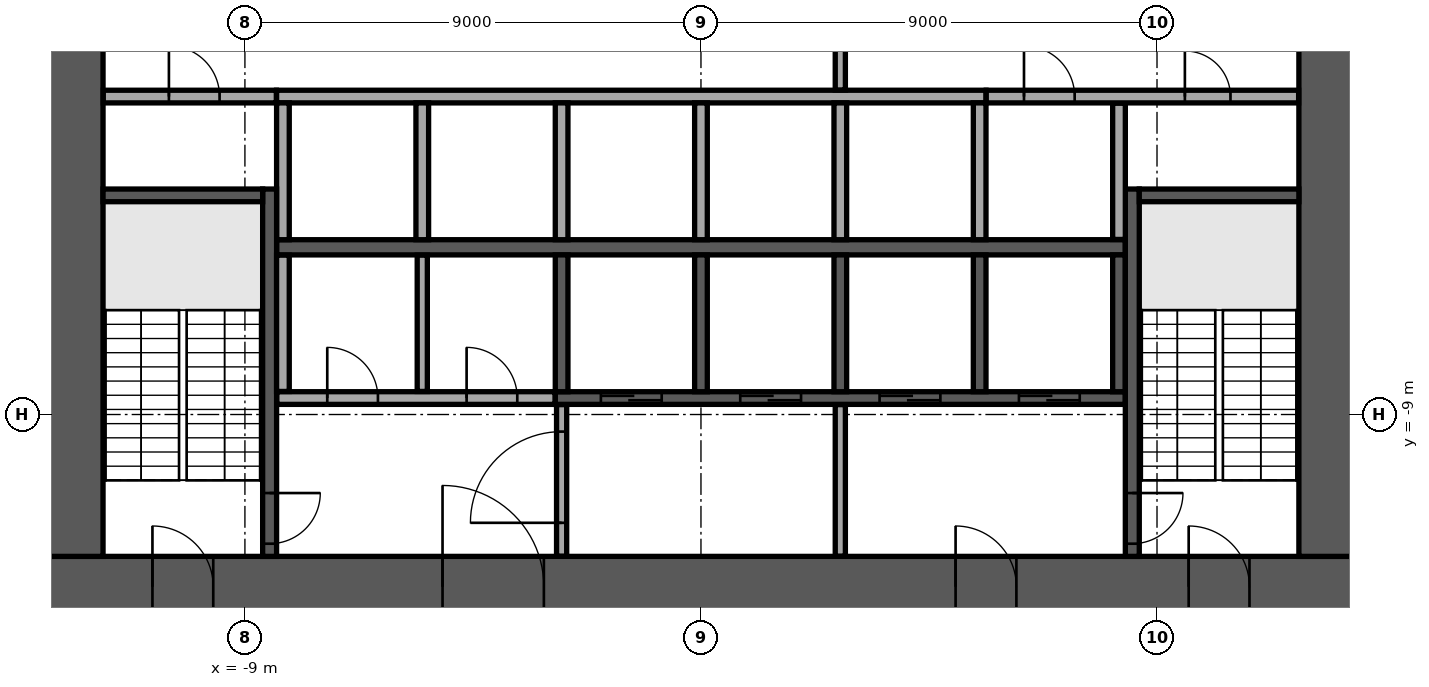
"""IFC4 building model, lengths in metres.
Left out: names, types, materials, properties, quantities, classifications, styles, units other than length and angle.
Written with IfcOpenShell. Run it as: python <this file> out.ifc"""

import sys

from ifc_helpers import new_model, si_unit, direction, frame, frame_2d, origin, place, context, subcontext, project, spatial, rectangle, extrude, element, fill, save


model = new_model("IFC4")
c1 = context("Model", 3, precision=1e-05, world=origin(), true_north=direction((0.0, 1.0)))
c2 = subcontext(c1, "Body", "Model", "MODEL_VIEW")
j1 = project(units=[si_unit("LENGTHUNIT", "METRE"), si_unit("PLANEANGLEUNIT", "RADIAN")], contexts=[c1])
p1 = place(None, origin())
s1 = spatial("IfcSite", under=j1, at=p1, CompositionType="ELEMENT")
p2 = place(p1, origin())
s2 = spatial("IfcBuilding", under=s1, at=p2, CompositionType="ELEMENT")
p3 = place(p2, frame((0.0, 0.0, 27.3)))
s3 = spatial("IfcBuildingStorey", under=s2, at=p3, CompositionType="ELEMENT", Elevation=27.3)
p4 = place(p3, frame((-13.0, -12.4, 0.0), z_axis=(0.0, 0.0, 1.0), x_axis=(1.0, 0.0, 0.0)))
e1 = element("IfcWall", 1, at=p4, inside=s3, PredefinedType="SHEAR", context=c2, shape_type="SweptSolid", body=[
    extrude(rectangle(XDim=26.0, YDim=1.2, at=frame_2d((13.0, 0.0))), origin(), (0.0, 0.0, 1.0), 4.35),
])
p5 = place(p4, frame((7.9, 0.0, 0.0)))
e2 = element("IfcOpeningElement", 2, at=p5, cuts=e1, PredefinedType="OPENING", context=c2, shape_type="SweptSolid", body=[
    extrude(rectangle(XDim=2.0, YDim=2.1, at=frame_2d((1.0, 1.05))), frame((0.0, 0.61, 0.0), z_axis=(0.0, -1.0, 0.0), x_axis=(1.0, 0.0, 0.0)), (0.0, 0.0, 1.0), 1.22),
])
p6 = place(p4, frame((18.025, 0.0, 0.0)))
e3 = element("IfcOpeningElement", 3, at=p6, cuts=e1, PredefinedType="OPENING", context=c2, shape_type="SweptSolid", body=[
    extrude(rectangle(XDim=1.2, YDim=2.1, at=frame_2d((0.6, 1.05))), frame((0.0, 0.61, 0.0), z_axis=(0.0, -1.0, 0.0), x_axis=(1.0, 0.0, 0.0)), (0.0, 0.0, 1.0), 1.22),
])
p7 = place(p4, frame((2.175, 0.0, 0.0)))
e4 = element("IfcOpeningElement", 4, at=p7, cuts=e1, PredefinedType="OPENING", context=c2, shape_type="SweptSolid", body=[
    extrude(rectangle(XDim=1.2, YDim=2.1, at=frame_2d((0.6, 1.05))), frame((0.0, 0.61, 0.0), z_axis=(0.0, -1.0, 0.0), x_axis=(1.0, 0.0, 0.0)), (0.0, 0.0, 1.0), 1.22),
])
p8 = place(p4, frame((22.625, 0.0, 0.0)))
e5 = element("IfcOpeningElement", 5, at=p8, cuts=e1, PredefinedType="OPENING", context=c2, shape_type="SweptSolid", body=[
    extrude(rectangle(XDim=1.2, YDim=2.1, at=frame_2d((0.6, 1.05))), frame((0.0, 0.61, 0.0), z_axis=(0.0, -1.0, 0.0), x_axis=(1.0, 0.0, 0.0)), (0.0, 0.0, 1.0), 1.22),
])
p9 = place(p3, frame((12.4, -11.8, 0.0), z_axis=(0.0, 0.0, 1.0), x_axis=(0.0, 1.0, 0.0)))
e6 = element("IfcWall", 6, at=p9, inside=s3, PredefinedType="SHEAR", context=c2, shape_type="SweptSolid", body=[
    extrude(rectangle(XDim=23.6, YDim=1.2, at=frame_2d((11.8, 0.0))), origin(), (0.0, 0.0, 1.0), 4.35),
])
p10 = place(p9, frame((10.6, 0.0, 0.0)))
e7 = element("IfcOpeningElement", 7, at=p10, cuts=e6, PredefinedType="OPENING", context=c2, shape_type="SweptSolid", body=[
    extrude(rectangle(XDim=2.4, YDim=2.4, at=frame_2d((1.2, 1.2))), frame((0.0, 0.61, 0.0), z_axis=(0.0, -1.0, 0.0), x_axis=(1.0, 0.0, 0.0)), (0.0, 0.0, 1.0), 1.22),
])
p11 = place(p3, frame((-12.4, -11.8, 0.0), z_axis=(0.0, 0.0, 1.0), x_axis=(0.0, 1.0, 0.0)))
e8 = element("IfcWall", 8, at=p11, inside=s3, PredefinedType="SHEAR", context=c2, shape_type="SweptSolid", body=[
    extrude(rectangle(XDim=23.6, YDim=1.2, at=frame_2d((11.8, 0.0))), origin(), (0.0, 0.0, 1.0), 4.35),
])
p12 = place(p11, frame((10.6, 0.0, 0.0)))
e9 = element("IfcOpeningElement", 9, at=p12, cuts=e8, PredefinedType="OPENING", context=c2, shape_type="SweptSolid", body=[
    extrude(rectangle(XDim=2.4, YDim=2.4, at=frame_2d((1.2, 1.2))), frame((0.0, 0.61, 0.0), z_axis=(0.0, -1.0, 0.0), x_axis=(1.0, 0.0, 0.0)), (0.0, 0.0, 1.0), 1.22),
])
p13 = place(p3, frame((-8.375, -5.7, 0.0), z_axis=(0.0, 0.0, 1.0), x_axis=(1.0, 0.0, 0.0)))
e10 = element("IfcWall", 10, at=p13, inside=s3, PredefinedType="SOLIDWALL", context=c2, shape_type="SweptSolid", body=[
    extrude(rectangle(XDim=16.75, YDim=0.3, at=frame_2d((8.375, 0.0))), origin(), (0.0, 0.0, 1.0), 4.35),
])
p14 = place(p3, frame((-8.375, -2.725, 0.0), z_axis=(0.0, 0.0, 1.0), x_axis=(1.0, 0.0, 0.0)))
e11 = element("IfcWall", 11, at=p14, inside=s3, PredefinedType="SOLIDWALL", context=c2, shape_type="SweptSolid", body=[
    extrude(rectangle(XDim=14.0, YDim=0.25, at=frame_2d((7.0, 0.0))), origin(), (0.0, 0.0, 1.0), 4.35),
])
for number, where, z_axis, x_axis in (
    (12, (-8.25, -5.55, 0.0), (0.0, 0.0, 1.0), (0.0, 1.0, 0.0)),
    (13, (-5.5, -5.55, 0.0), (0.0, 0.0, 1.0), (0.0, 1.0, 0.0)),
    (14, (-2.75, -5.55, 0.0), (0.0, 0.0, 1.0), (0.0, 1.0, 0.0)),
    (15, (0.0, -5.55, 0.0), (0.0, 0.0, 1.0), (0.0, 1.0, 0.0)),
    (16, (2.75, -5.55, 0.0), (0.0, 0.0, 1.0), (0.0, 1.0, 0.0)),
    (17, (5.5, -5.55, 0.0), (0.0, 0.0, 1.0), (0.0, 1.0, 0.0)),
):
    element("IfcWall", number, at=place(p3, frame(where, z_axis=z_axis, x_axis=x_axis)), inside=s3, PredefinedType="SOLIDWALL", context=c2, shape_type="SweptSolid", body=[
        extrude(rectangle(XDim=2.7, YDim=0.25, at=frame_2d((1.35, 0.0))), origin(), (0.0, 0.0, 1.0), 4.35),
    ])
p15 = place(p3, frame((-2.875, -8.675, 0.0), z_axis=(0.0, 0.0, 1.0), x_axis=(1.0, 0.0, 0.0)))
e18 = element("IfcWall", 18, at=p15, inside=s3, PredefinedType="SOLIDWALL", context=c2, shape_type="SweptSolid", body=[
    extrude(rectangle(XDim=11.25, YDim=0.25, at=frame_2d((5.625, 0.0))), origin(), (0.0, 0.0, 1.0), 4.35),
])
p16 = place(p15, frame((0.9, 0.0, 0.0)))
e19 = element("IfcOpeningElement", 19, at=p16, cuts=e18, PredefinedType="OPENING", context=c2, shape_type="SweptSolid", body=[
    extrude(rectangle(XDim=1.2, YDim=2.1, at=frame_2d((0.6, 1.05))), frame((0.0, 0.135, 0.0), z_axis=(0.0, -1.0, 0.0), x_axis=(1.0, 0.0, 0.0)), (0.0, 0.0, 1.0), 0.27),
])
p17 = place(p15, frame((3.65, 0.0, 0.0)))
e20 = element("IfcOpeningElement", 20, at=p17, cuts=e18, PredefinedType="OPENING", context=c2, shape_type="SweptSolid", body=[
    extrude(rectangle(XDim=1.2, YDim=2.1, at=frame_2d((0.6, 1.05))), frame((0.0, 0.135, 0.0), z_axis=(0.0, -1.0, 0.0), x_axis=(1.0, 0.0, 0.0)), (0.0, 0.0, 1.0), 0.27),
])
p18 = place(p15, frame((6.4, 0.0, 0.0)))
e21 = element("IfcOpeningElement", 21, at=p18, cuts=e18, PredefinedType="OPENING", context=c2, shape_type="SweptSolid", body=[
    extrude(rectangle(XDim=1.2, YDim=2.1, at=frame_2d((0.6, 1.05))), frame((0.0, 0.135, 0.0), z_axis=(0.0, -1.0, 0.0), x_axis=(1.0, 0.0, 0.0)), (0.0, 0.0, 1.0), 0.27),
])
p19 = place(p15, frame((9.15, 0.0, 0.0)))
e22 = element("IfcOpeningElement", 22, at=p19, cuts=e18, PredefinedType="OPENING", context=c2, shape_type="SweptSolid", body=[
    extrude(rectangle(XDim=1.2, YDim=2.1, at=frame_2d((0.6, 1.05))), frame((0.0, 0.135, 0.0), z_axis=(0.0, -1.0, 0.0), x_axis=(1.0, 0.0, 0.0)), (0.0, 0.0, 1.0), 0.27),
])
for number, where, z_axis, x_axis in (
    (23, (-2.75, -8.55, 0.0), (0.0, 0.0, 1.0), (0.0, 1.0, 0.0)),
    (24, (0.0, -8.55, 0.0), (0.0, 0.0, 1.0), (0.0, 1.0, 0.0)),
    (25, (2.75, -8.55, 0.0), (0.0, 0.0, 1.0), (0.0, 1.0, 0.0)),
    (26, (5.5, -8.55, 0.0), (0.0, 0.0, 1.0), (0.0, 1.0, 0.0)),
    (27, (8.25, -8.55, 0.0), (0.0, 0.0, 1.0), (0.0, 1.0, 0.0)),
):
    element("IfcWall", number, at=place(p3, frame(where, z_axis=z_axis, x_axis=x_axis)), inside=s3, PredefinedType="SOLIDWALL", context=c2, shape_type="SweptSolid", body=[
        extrude(rectangle(XDim=2.7, YDim=0.25, at=frame_2d((1.35, 0.0))), origin(), (0.0, 0.0, 1.0), 4.35),
    ])
p20 = place(p3, frame((-8.512, -4.55, 0.0), z_axis=(0.0, 0.0, 1.0), x_axis=(0.0, -1.0, 0.0)))
e28 = element("IfcWall", 28, at=p20, inside=s3, PredefinedType="SOLIDWALL", context=c2, shape_type="SweptSolid", body=[
    extrude(rectangle(XDim=7.25, YDim=0.275, at=frame_2d((3.625, 0.0))), origin(), (0.0, 0.0, 1.0), 4.35),
])
p21 = place(p20, frame((6.0, 0.0, 0.0)))
e29 = element("IfcOpeningElement", 29, at=p21, cuts=e28, PredefinedType="OPENING", context=c2, shape_type="SweptSolid", body=[
    extrude(rectangle(XDim=1.0, YDim=2.1, at=frame_2d((0.5, 1.05))), frame((0.0, 0.147, 0.0), z_axis=(0.0, -1.0, 0.0), x_axis=(1.0, 0.0, 0.0)), (0.0, 0.0, 1.0), 0.295),
])
p22 = place(p3, frame((-8.65, -4.675, 0.0), z_axis=(0.0, 0.0, 1.0), x_axis=(-1.0, 0.0, 0.0)))
e30 = element("IfcWall", 30, at=p22, inside=s3, PredefinedType="SOLIDWALL", context=c2, shape_type="SweptSolid", body=[
    extrude(rectangle(XDim=3.15, YDim=0.25, at=frame_2d((1.575, 0.0))), origin(), (0.0, 0.0, 1.0), 4.35),
])
p23 = place(p3, frame((8.512, -4.55, 0.0), z_axis=(0.0, 0.0, 1.0), x_axis=(0.0, -1.0, 0.0)))
e31 = element("IfcWall", 31, at=p23, inside=s3, PredefinedType="SOLIDWALL", context=c2, shape_type="SweptSolid", body=[
    extrude(rectangle(XDim=7.25, YDim=0.275, at=frame_2d((3.625, 0.0))), origin(), (0.0, 0.0, 1.0), 4.35),
])
p24 = place(p23, frame((6.0, 0.0, 0.0)))
e32 = element("IfcOpeningElement", 32, at=p24, cuts=e31, PredefinedType="OPENING", context=c2, shape_type="SweptSolid", body=[
    extrude(rectangle(XDim=1.0, YDim=2.1, at=frame_2d((0.5, 1.05))), frame((0.0, 0.147, 0.0), z_axis=(0.0, -1.0, 0.0), x_axis=(1.0, 0.0, 0.0)), (0.0, 0.0, 1.0), 0.295),
])
p25 = place(p3, frame((8.65, -4.675, 0.0), z_axis=(0.0, 0.0, 1.0), x_axis=(1.0, 0.0, 0.0)))
e33 = element("IfcWall", 33, at=p25, inside=s3, PredefinedType="SOLIDWALL", context=c2, shape_type="SweptSolid", body=[
    extrude(rectangle(XDim=3.15, YDim=0.25, at=frame_2d((1.575, 0.0))), origin(), (0.0, 0.0, 1.0), 4.35),
])
p26 = place(p3, frame((-2.75, -11.795, 0.0), z_axis=(0.0, 0.0, 1.0), x_axis=(0.0, 1.0, 0.0)))
e34 = element("IfcWall", 34, at=p26, inside=s3, PredefinedType="PARTITIONING", context=c2, shape_type="SweptSolid", body=[
    extrude(rectangle(XDim=2.99, YDim=0.2, at=frame_2d((1.495, 0.0))), origin(), (0.0, 0.0, 1.0), 4.35),
])
p27 = place(p26, frame((0.657, 0.0, 0.0)))
e35 = element("IfcOpeningElement", 35, at=p27, cuts=e34, PredefinedType="OPENING", context=c2, shape_type="SweptSolid", body=[
    extrude(rectangle(XDim=1.8, YDim=2.1, at=frame_2d((0.9, 1.05))), frame((0.0, 0.11, 0.0), z_axis=(0.0, -1.0, 0.0), x_axis=(1.0, 0.0, 0.0)), (0.0, 0.0, 1.0), 0.22),
])
p28 = place(p3, frame((2.75, -11.795, 0.0), z_axis=(0.0, 0.0, 1.0), x_axis=(0.0, 1.0, 0.0)))
e36 = element("IfcWall", 36, at=p28, inside=s3, PredefinedType="PARTITIONING", context=c2, shape_type="SweptSolid", body=[
    extrude(rectangle(XDim=2.99, YDim=0.2, at=frame_2d((1.495, 0.0))), origin(), (0.0, 0.0, 1.0), 4.35),
])
p29 = place(p3, frame((-8.37, -8.675, 0.0), z_axis=(0.0, 0.0, 1.0), x_axis=(1.0, 0.0, 0.0)))
e37 = element("IfcWall", 37, at=p29, inside=s3, PredefinedType="PARTITIONING", context=c2, shape_type="SweptSolid", body=[
    extrude(rectangle(XDim=5.49, YDim=0.25, at=frame_2d((2.745, 0.0))), origin(), (0.0, 0.0, 1.0), 4.35),
])
p30 = place(p29, frame((0.995, 0.0, 0.0)))
e38 = element("IfcOpeningElement", 38, at=p30, cuts=e37, PredefinedType="OPENING", context=c2, shape_type="SweptSolid", body=[
    extrude(rectangle(XDim=1.0, YDim=2.1, at=frame_2d((0.5, 1.05))), frame((0.0, 0.135, 0.0), z_axis=(0.0, -1.0, 0.0), x_axis=(1.0, 0.0, 0.0)), (0.0, 0.0, 1.0), 0.27),
])
p31 = place(p29, frame((3.745, 0.0, 0.0)))
e39 = element("IfcOpeningElement", 39, at=p31, cuts=e37, PredefinedType="OPENING", context=c2, shape_type="SweptSolid", body=[
    extrude(rectangle(XDim=1.0, YDim=2.1, at=frame_2d((0.5, 1.05))), frame((0.0, 0.135, 0.0), z_axis=(0.0, -1.0, 0.0), x_axis=(1.0, 0.0, 0.0)), (0.0, 0.0, 1.0), 0.27),
])
p32 = place(p3, frame((-8.25, -8.545, 0.0), z_axis=(0.0, 0.0, 1.0), x_axis=(0.0, 1.0, 0.0)))
e40 = element("IfcWall", 40, at=p32, inside=s3, PredefinedType="PARTITIONING", context=c2, shape_type="SweptSolid", body=[
    extrude(rectangle(XDim=2.69, YDim=0.25, at=frame_2d((1.345, 0.0))), origin(), (0.0, 0.0, 1.0), 4.35),
])
p33 = place(p3, frame((-5.5, -8.545, 0.0), z_axis=(0.0, 0.0, 1.0), x_axis=(0.0, 1.0, 0.0)))
e41 = element("IfcWall", 41, at=p33, inside=s3, PredefinedType="PARTITIONING", context=c2, shape_type="SweptSolid", body=[
    extrude(rectangle(XDim=2.69, YDim=0.2, at=frame_2d((1.345, 0.0))), origin(), (0.0, 0.0, 1.0), 4.35),
])
p34 = place(p3, frame((8.25, -5.545, 0.0), z_axis=(0.0, 0.0, 1.0), x_axis=(0.0, 1.0, 0.0)))
e42 = element("IfcWall", 42, at=p34, inside=s3, PredefinedType="PARTITIONING", context=c2, shape_type="SweptSolid", body=[
    extrude(rectangle(XDim=2.69, YDim=0.25, at=frame_2d((1.345, 0.0))), origin(), (0.0, 0.0, 1.0), 4.35),
])
p35 = place(p3, frame((-11.795, -2.725, 0.0), z_axis=(0.0, 0.0, 1.0), x_axis=(1.0, 0.0, 0.0)))
e43 = element("IfcWall", 43, at=p35, inside=s3, PredefinedType="PARTITIONING", context=c2, shape_type="SweptSolid", body=[
    extrude(rectangle(XDim=3.415, YDim=0.25, at=frame_2d((1.708, 0.0))), origin(), (0.0, 0.0, 1.0), 4.35),
])
p36 = place(p35, frame((1.295, 0.0, 0.0)))
e44 = element("IfcOpeningElement", 44, at=p36, cuts=e43, PredefinedType="OPENING", context=c2, shape_type="SweptSolid", body=[
    extrude(rectangle(XDim=1.0, YDim=2.1, at=frame_2d((0.5, 1.05))), frame((0.0, 0.135, 0.0), z_axis=(0.0, -1.0, 0.0), x_axis=(1.0, 0.0, 0.0)), (0.0, 0.0, 1.0), 0.27),
])
p37 = place(p3, frame((5.63, -2.725, 0.0), z_axis=(0.0, 0.0, 1.0), x_axis=(1.0, 0.0, 0.0)))
e45 = element("IfcWall", 45, at=p37, inside=s3, PredefinedType="PARTITIONING", context=c2, shape_type="SweptSolid", body=[
    extrude(rectangle(XDim=6.165, YDim=0.25, at=frame_2d((3.083, 0.0))), origin(), (0.0, 0.0, 1.0), 4.35),
])
p38 = place(p37, frame((0.745, 0.0, 0.0)))
e46 = element("IfcOpeningElement", 46, at=p38, cuts=e45, PredefinedType="OPENING", context=c2, shape_type="SweptSolid", body=[
    extrude(rectangle(XDim=1.0, YDim=2.1, at=frame_2d((0.5, 1.05))), frame((0.0, 0.135, 0.0), z_axis=(0.0, -1.0, 0.0), x_axis=(1.0, 0.0, 0.0)), (0.0, 0.0, 1.0), 0.27),
])
p39 = place(p37, frame((3.92, 0.0, 0.0)))
e47 = element("IfcOpeningElement", 47, at=p39, cuts=e45, PredefinedType="OPENING", context=c2, shape_type="SweptSolid", body=[
    extrude(rectangle(XDim=0.9, YDim=2.1, at=frame_2d((0.45, 1.05))), frame((0.0, 0.135, 0.0), z_axis=(0.0, -1.0, 0.0), x_axis=(1.0, 0.0, 0.0)), (0.0, 0.0, 1.0), 0.27),
])
p40 = place(p3, frame((2.75, -2.595, 0.0), z_axis=(0.0, 0.0, 1.0), x_axis=(0.0, 1.0, 0.0)))
e48 = element("IfcWall", 48, at=p40, inside=s3, PredefinedType="PARTITIONING", context=c2, shape_type="SweptSolid", body=[
    extrude(rectangle(XDim=5.19, YDim=0.2, at=frame_2d((2.595, 0.0))), origin(), (0.0, 0.0, 1.0), 4.35),
])
p41 = place(p40, frame((1.395, 0.0, 0.0)))
e49 = element("IfcOpeningElement", 49, at=p41, cuts=e48, PredefinedType="OPENING", context=c2, shape_type="SweptSolid", body=[
    extrude(rectangle(XDim=2.4, YDim=2.4, at=frame_2d((1.2, 1.2))), frame((0.0, 0.11, 0.0), z_axis=(0.0, -1.0, 0.0), x_axis=(1.0, 0.0, 0.0)), (0.0, 0.0, 1.0), 0.22),
])
p42 = place(p5, origin())
e50 = element("IfcDoor", 50, at=p42, inside=s3, OperationType="SINGLE_SWING_LEFT", PredefinedType="DOOR", context=c2, shape_type="SweptSolid", body=[
    extrude(rectangle(XDim=2.0, YDim=2.1, at=frame_2d((1.0, 1.05))), frame((0.0, 0.025, 0.0), z_axis=(0.0, -1.0, 0.0), x_axis=(1.0, 0.0, 0.0)), (0.0, 0.0, 1.0), 0.05),
])
fill(e2, e50)
p43 = place(p6, origin())
e51 = element("IfcDoor", 51, at=p43, inside=s3, OperationType="SINGLE_SWING_LEFT", PredefinedType="DOOR", context=c2, shape_type="SweptSolid", body=[
    extrude(rectangle(XDim=1.2, YDim=2.1, at=frame_2d((0.6, 1.05))), frame((0.0, 0.025, 0.0), z_axis=(0.0, -1.0, 0.0), x_axis=(1.0, 0.0, 0.0)), (0.0, 0.0, 1.0), 0.05),
])
fill(e3, e51)
p44 = place(p7, origin())
e52 = element("IfcDoor", 52, at=p44, inside=s3, OperationType="SINGLE_SWING_LEFT", PredefinedType="DOOR", context=c2, shape_type="SweptSolid", body=[
    extrude(rectangle(XDim=1.2, YDim=2.1, at=frame_2d((0.6, 1.05))), frame((0.0, 0.025, 0.0), z_axis=(0.0, -1.0, 0.0), x_axis=(1.0, 0.0, 0.0)), (0.0, 0.0, 1.0), 0.05),
])
fill(e4, e52)
p45 = place(p8, origin())
e53 = element("IfcDoor", 53, at=p45, inside=s3, OperationType="SINGLE_SWING_LEFT", PredefinedType="DOOR", context=c2, shape_type="SweptSolid", body=[
    extrude(rectangle(XDim=1.2, YDim=2.1, at=frame_2d((0.6, 1.05))), frame((0.0, 0.025, 0.0), z_axis=(0.0, -1.0, 0.0), x_axis=(1.0, 0.0, 0.0)), (0.0, 0.0, 1.0), 0.05),
])
fill(e5, e53)
p46 = place(p16, origin())
e54 = element("IfcDoor", 54, at=p46, inside=s3, OperationType="DOUBLE_DOOR_SLIDING", PredefinedType="DOOR", context=c2, shape_type="SweptSolid", body=[
    extrude(rectangle(XDim=1.2, YDim=2.1, at=frame_2d((0.6, 1.05))), frame((0.0, 0.025, 0.0), z_axis=(0.0, -1.0, 0.0), x_axis=(1.0, 0.0, 0.0)), (0.0, 0.0, 1.0), 0.05),
])
fill(e19, e54)
p47 = place(p17, origin())
e55 = element("IfcDoor", 55, at=p47, inside=s3, OperationType="DOUBLE_DOOR_SLIDING", PredefinedType="DOOR", context=c2, shape_type="SweptSolid", body=[
    extrude(rectangle(XDim=1.2, YDim=2.1, at=frame_2d((0.6, 1.05))), frame((0.0, 0.025, 0.0), z_axis=(0.0, -1.0, 0.0), x_axis=(1.0, 0.0, 0.0)), (0.0, 0.0, 1.0), 0.05),
])
fill(e20, e55)
p48 = place(p18, origin())
e56 = element("IfcDoor", 56, at=p48, inside=s3, OperationType="DOUBLE_DOOR_SLIDING", PredefinedType="DOOR", context=c2, shape_type="SweptSolid", body=[
    extrude(rectangle(XDim=1.2, YDim=2.1, at=frame_2d((0.6, 1.05))), frame((0.0, 0.025, 0.0), z_axis=(0.0, -1.0, 0.0), x_axis=(1.0, 0.0, 0.0)), (0.0, 0.0, 1.0), 0.05),
])
fill(e21, e56)
p49 = place(p19, origin())
e57 = element("IfcDoor", 57, at=p49, inside=s3, OperationType="DOUBLE_DOOR_SLIDING", PredefinedType="DOOR", context=c2, shape_type="SweptSolid", body=[
    extrude(rectangle(XDim=1.2, YDim=2.1, at=frame_2d((0.6, 1.05))), frame((0.0, 0.025, 0.0), z_axis=(0.0, -1.0, 0.0), x_axis=(1.0, 0.0, 0.0)), (0.0, 0.0, 1.0), 0.05),
])
fill(e22, e57)
p50 = place(p21, origin())
e58 = element("IfcDoor", 58, at=p50, inside=s3, OperationType="SINGLE_SWING_LEFT", PredefinedType="DOOR", context=c2, shape_type="SweptSolid", body=[
    extrude(rectangle(XDim=1.0, YDim=2.1, at=frame_2d((0.5, 1.05))), frame((0.0, 0.025, 0.0), z_axis=(0.0, -1.0, 0.0), x_axis=(1.0, 0.0, 0.0)), (0.0, 0.0, 1.0), 0.05),
])
fill(e29, e58)
p51 = place(p24, origin())
e59 = element("IfcDoor", 59, at=p51, inside=s3, OperationType="SINGLE_SWING_LEFT", PredefinedType="DOOR", context=c2, shape_type="SweptSolid", body=[
    extrude(rectangle(XDim=1.0, YDim=2.1, at=frame_2d((0.5, 1.05))), frame((0.0, 0.025, 0.0), z_axis=(0.0, -1.0, 0.0), x_axis=(1.0, 0.0, 0.0)), (0.0, 0.0, 1.0), 0.05),
])
fill(e32, e59)
p52 = place(p30, origin())
e60 = element("IfcDoor", 60, at=p52, inside=s3, OperationType="SINGLE_SWING_LEFT", PredefinedType="DOOR", context=c2, shape_type="SweptSolid", body=[
    extrude(rectangle(XDim=1.0, YDim=2.1, at=frame_2d((0.5, 1.05))), frame((0.0, 0.025, 0.0), z_axis=(0.0, -1.0, 0.0), x_axis=(1.0, 0.0, 0.0)), (0.0, 0.0, 1.0), 0.05),
])
fill(e38, e60)
p53 = place(p31, origin())
e61 = element("IfcDoor", 61, at=p53, inside=s3, OperationType="SINGLE_SWING_LEFT", PredefinedType="DOOR", context=c2, shape_type="SweptSolid", body=[
    extrude(rectangle(XDim=1.0, YDim=2.1, at=frame_2d((0.5, 1.05))), frame((0.0, 0.025, 0.0), z_axis=(0.0, -1.0, 0.0), x_axis=(1.0, 0.0, 0.0)), (0.0, 0.0, 1.0), 0.05),
])
fill(e39, e61)
p54 = place(p36, origin())
e62 = element("IfcDoor", 62, at=p54, inside=s3, OperationType="SINGLE_SWING_LEFT", PredefinedType="DOOR", context=c2, shape_type="SweptSolid", body=[
    extrude(rectangle(XDim=1.0, YDim=2.1, at=frame_2d((0.5, 1.05))), frame((0.0, 0.025, 0.0), z_axis=(0.0, -1.0, 0.0), x_axis=(1.0, 0.0, 0.0)), (0.0, 0.0, 1.0), 0.05),
])
fill(e44, e62)
p55 = place(p38, origin())
e63 = element("IfcDoor", 63, at=p55, inside=s3, OperationType="SINGLE_SWING_LEFT", PredefinedType="DOOR", context=c2, shape_type="SweptSolid", body=[
    extrude(rectangle(XDim=1.0, YDim=2.1, at=frame_2d((0.5, 1.05))), frame((0.0, 0.025, 0.0), z_axis=(0.0, -1.0, 0.0), x_axis=(1.0, 0.0, 0.0)), (0.0, 0.0, 1.0), 0.05),
])
fill(e46, e63)
p56 = place(p39, origin())
e64 = element("IfcDoor", 64, at=p56, inside=s3, OperationType="SINGLE_SWING_LEFT", PredefinedType="DOOR", context=c2, shape_type="SweptSolid", body=[
    extrude(rectangle(XDim=0.9, YDim=2.1, at=frame_2d((0.45, 1.05))), frame((0.0, 0.025, 0.0), z_axis=(0.0, -1.0, 0.0), x_axis=(1.0, 0.0, 0.0)), (0.0, 0.0, 1.0), 0.05),
])
fill(e47, e64)
p57 = place(p27, origin())
e65 = element("IfcDoor", 65, at=p57, inside=s3, OperationType="SINGLE_SWING_LEFT", PredefinedType="DOOR", context=c2, shape_type="SweptSolid", body=[
    extrude(rectangle(XDim=1.8, YDim=2.1, at=frame_2d((0.9, 1.05))), frame((0.0, 0.025, 0.0), z_axis=(0.0, -1.0, 0.0), x_axis=(1.0, 0.0, 0.0)), (0.0, 0.0, 1.0), 0.05),
])
fill(e35, e65)
save(model, sys.argv[1])
